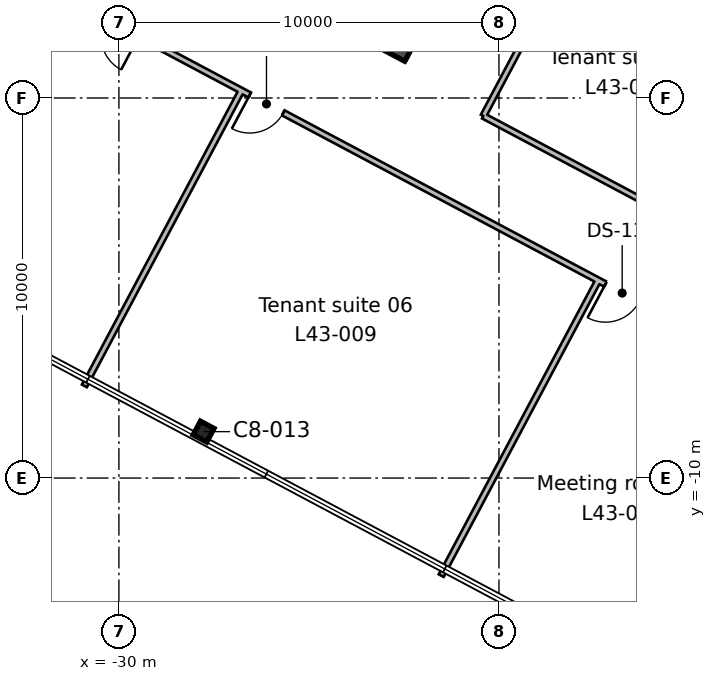
"""IFC4 building model, lengths in metres.
Left out: names, types, materials, properties, quantities, classifications, styles, units other than length and angle.
Written with IfcOpenShell. Run it as: python <this file> out.ifc"""

import sys

from ifc_helpers import new_model, si_unit, direction, frame, frame_2d, origin, origin_2d, place, context, subcontext, project, spatial, rectangle, i_section, extrude, element, fill, save


model = new_model("IFC4")
c1 = context("Model", 3, precision=1e-05, world=origin(), true_north=direction((0.0, 1.0)))
c2 = subcontext(c1, "Body", "Model", "MODEL_VIEW")
j1 = project(units=[si_unit("LENGTHUNIT", "METRE"), si_unit("PLANEANGLEUNIT", "RADIAN")], contexts=[c1])
p1 = place(None, origin())
s1 = spatial("IfcSite", under=j1, at=p1, CompositionType="ELEMENT")
p2 = place(p1, origin())
s2 = spatial("IfcBuilding", under=s1, at=p2, CompositionType="ELEMENT")
p3 = place(p2, frame((0.0, 0.0, 201.3)))
s3 = spatial("IfcBuildingStorey", under=s2, at=p3, CompositionType="ELEMENT", Elevation=201.3)
p4 = place(p3, frame((-27.772, -8.779, 0.0), z_axis=(0.0, 0.0, 1.0), x_axis=(0.882947592859, -0.469471562786, 0.0)))
e1 = element("IfcColumn", 1, at=p4, inside=s3, PredefinedType="COLUMN", context=c2, shape_type="SweptSolid", body=[
    extrude(i_section(OverallWidth=0.404, OverallDepth=0.406, WebThickness=0.027, FlangeThickness=0.044, FilletRadius=0.015, at=origin_2d()), origin(), (0.0, 0.0, 1.0), 3.9),
])
p5 = place(p3, frame((-13.635, 18.236, 0.0), z_axis=(0.0, 0.0, 1.0), x_axis=(-0.469478769487, -0.88294376095, 0.0)))
e2 = element("IfcWall", 2, at=p5, inside=s3, PredefinedType="SHEAR", context=c2, shape_type="SweptSolid", body=[
    extrude(rectangle(XDim=19.4, YDim=0.6, at=frame_2d((9.7, 0.0))), origin(), (0.0, 0.0, 1.0), 3.9),
])
p6 = place(p5, frame((6.7, 0.0, 0.0)))
e3 = element("IfcOpeningElement", 3, at=p6, cuts=e2, PredefinedType="OPENING", context=c2, shape_type="SweptSolid", body=[
    extrude(rectangle(XDim=2.4, YDim=2.4, at=frame_2d((1.2, 1.2))), frame((0.0, 0.31, 0.0), z_axis=(0.0, -1.0, 0.0), x_axis=(1.0, 0.0, 0.0)), (0.0, 0.0, 1.0), 0.62),
])
p7 = place(p3, frame((-26.777, 0.194, 0.0), z_axis=(0.0, 0.0, 1.0), x_axis=(-0.469510830369, -0.882926712794, 0.0)))
e4 = element("IfcWall", 4, at=p7, inside=s3, PredefinedType="PARTITIONING", context=c2, shape_type="SweptSolid", body=[
    extrude(rectangle(XDim=8.8, YDim=0.15, at=frame_2d((4.4, 0.0))), origin(), (0.0, 0.0, 1.0), 3.54),
])
p8 = place(p3, frame((-13.8, -6.706, 0.0), z_axis=(0.0, 0.0, 1.0), x_axis=(-0.882947286887, 0.469472138235, 0.0)))
e5 = element("IfcWall", 5, at=p8, inside=s3, PredefinedType="PARTITIONING", context=c2, shape_type="SweptSolid", body=[
    extrude(rectangle(XDim=36.571, YDim=0.15, at=frame_2d((18.285, 0.0))), origin(), (0.0, 0.0, 1.0), 3.54),
])
p9 = place(p8, frame((34.15, 0.0, 0.0)))
e6 = element("IfcOpeningElement", 6, at=p9, cuts=e5, PredefinedType="OPENING", context=c2, shape_type="SweptSolid", body=[
    extrude(rectangle(XDim=1.0, YDim=2.1, at=frame_2d((0.5, 1.05))), frame((0.0, 0.085, 0.0), z_axis=(0.0, -1.0, 0.0), x_axis=(1.0, 0.0, 0.0)), (0.0, 0.0, 1.0), 0.17),
])
p10 = place(p8, frame((17.75, 0.0, 0.0)))
e7 = element("IfcOpeningElement", 7, at=p10, cuts=e5, PredefinedType="OPENING", context=c2, shape_type="SweptSolid", body=[
    extrude(rectangle(XDim=1.0, YDim=2.1, at=frame_2d((0.5, 1.05))), frame((0.0, 0.085, 0.0), z_axis=(0.0, -1.0, 0.0), x_axis=(1.0, 0.0, 0.0)), (0.0, 0.0, 1.0), 0.17),
])
p11 = place(p8, frame((13.45, 0.0, 0.0)))
e8 = element("IfcOpeningElement", 8, at=p11, cuts=e5, PredefinedType="OPENING", context=c2, shape_type="SweptSolid", body=[
    extrude(rectangle(XDim=1.0, YDim=2.1, at=frame_2d((0.5, 1.05))), frame((0.0, 0.085, 0.0), z_axis=(0.0, -1.0, 0.0), x_axis=(1.0, 0.0, 0.0)), (0.0, 0.0, 1.0), 0.17),
])
p12 = place(p8, frame((2.85, 0.0, 0.0)))
e9 = element("IfcOpeningElement", 9, at=p12, cuts=e5, PredefinedType="OPENING", context=c2, shape_type="SweptSolid", body=[
    extrude(rectangle(XDim=1.0, YDim=2.1, at=frame_2d((0.5, 1.05))), frame((0.0, 0.085, 0.0), z_axis=(0.0, -1.0, 0.0), x_axis=(1.0, 0.0, 0.0)), (0.0, 0.0, 1.0), 0.17),
])
p13 = place(p3, frame((-17.388, -4.798, 0.0), z_axis=(0.0, 0.0, 1.0), x_axis=(-0.469532456729, -0.882915212281, 0.0)))
e10 = element("IfcWall", 10, at=p13, inside=s3, PredefinedType="PARTITIONING", context=c2, shape_type="SweptSolid", body=[
    extrude(rectangle(XDim=8.8, YDim=0.15, at=frame_2d((4.4, 0.0))), origin(), (0.0, 0.0, 1.0), 3.54),
])
p14 = place(p3, frame((-20.411, -0.473, 0.0), z_axis=(0.0, 0.0, 1.0), x_axis=(0.469451816494, 0.882958091865, 0.0)))
e11 = element("IfcWall", 11, at=p14, inside=s3, PredefinedType="PARTITIONING", context=c2, shape_type="SweptSolid", body=[
    extrude(rectangle(XDim=20.0, YDim=0.15, at=frame_2d((10.0, 0.0))), origin(), (0.0, 0.0, 1.0), 3.54),
])
p15 = place(p14, frame((9.45, 0.0, 0.0)))
e12 = element("IfcOpeningElement", 12, at=p15, cuts=e11, PredefinedType="OPENING", context=c2, shape_type="SweptSolid", body=[
    extrude(rectangle(XDim=1.0, YDim=2.1, at=frame_2d((0.5, 1.05))), frame((0.0, 0.085, 0.0), z_axis=(0.0, -1.0, 0.0), x_axis=(1.0, 0.0, 0.0)), (0.0, 0.0, 1.0), 0.17),
])
p16 = place(p3, frame((-13.8, -3.988, 0.0), z_axis=(0.0, 0.0, 1.0), x_axis=(-0.88294256459, 0.469481019461, 0.0)))
e13 = element("IfcWall", 13, at=p16, inside=s3, PredefinedType="PARTITIONING", context=c2, shape_type="SweptSolid", body=[
    extrude(rectangle(XDim=7.487, YDim=0.15, at=frame_2d((3.744, 0.0))), origin(), (0.0, 0.0, 1.0), 3.54),
])
p17 = place(p11, origin())
e14 = element("IfcDoor", 14, at=p17, inside=s3, OperationType="SINGLE_SWING_RIGHT", PredefinedType="DOOR", context=c2, shape_type="SweptSolid", body=[
    extrude(rectangle(XDim=1.0, YDim=2.1, at=frame_2d((0.5, 1.05))), frame((0.0, 0.025, 0.0), z_axis=(0.0, -1.0, 0.0), x_axis=(1.0, 0.0, 0.0)), (0.0, 0.0, 1.0), 0.05),
])
fill(e8, e14)
p18 = place(p12, origin())
e15 = element("IfcDoor", 15, at=p18, inside=s3, OperationType="SINGLE_SWING_RIGHT", PredefinedType="DOOR", context=c2, shape_type="SweptSolid", body=[
    extrude(rectangle(XDim=1.0, YDim=2.1, at=frame_2d((0.5, 1.05))), frame((0.0, 0.025, 0.0), z_axis=(0.0, -1.0, 0.0), x_axis=(1.0, 0.0, 0.0)), (0.0, 0.0, 1.0), 0.05),
])
fill(e9, e15)
save(model, sys.argv[1])
